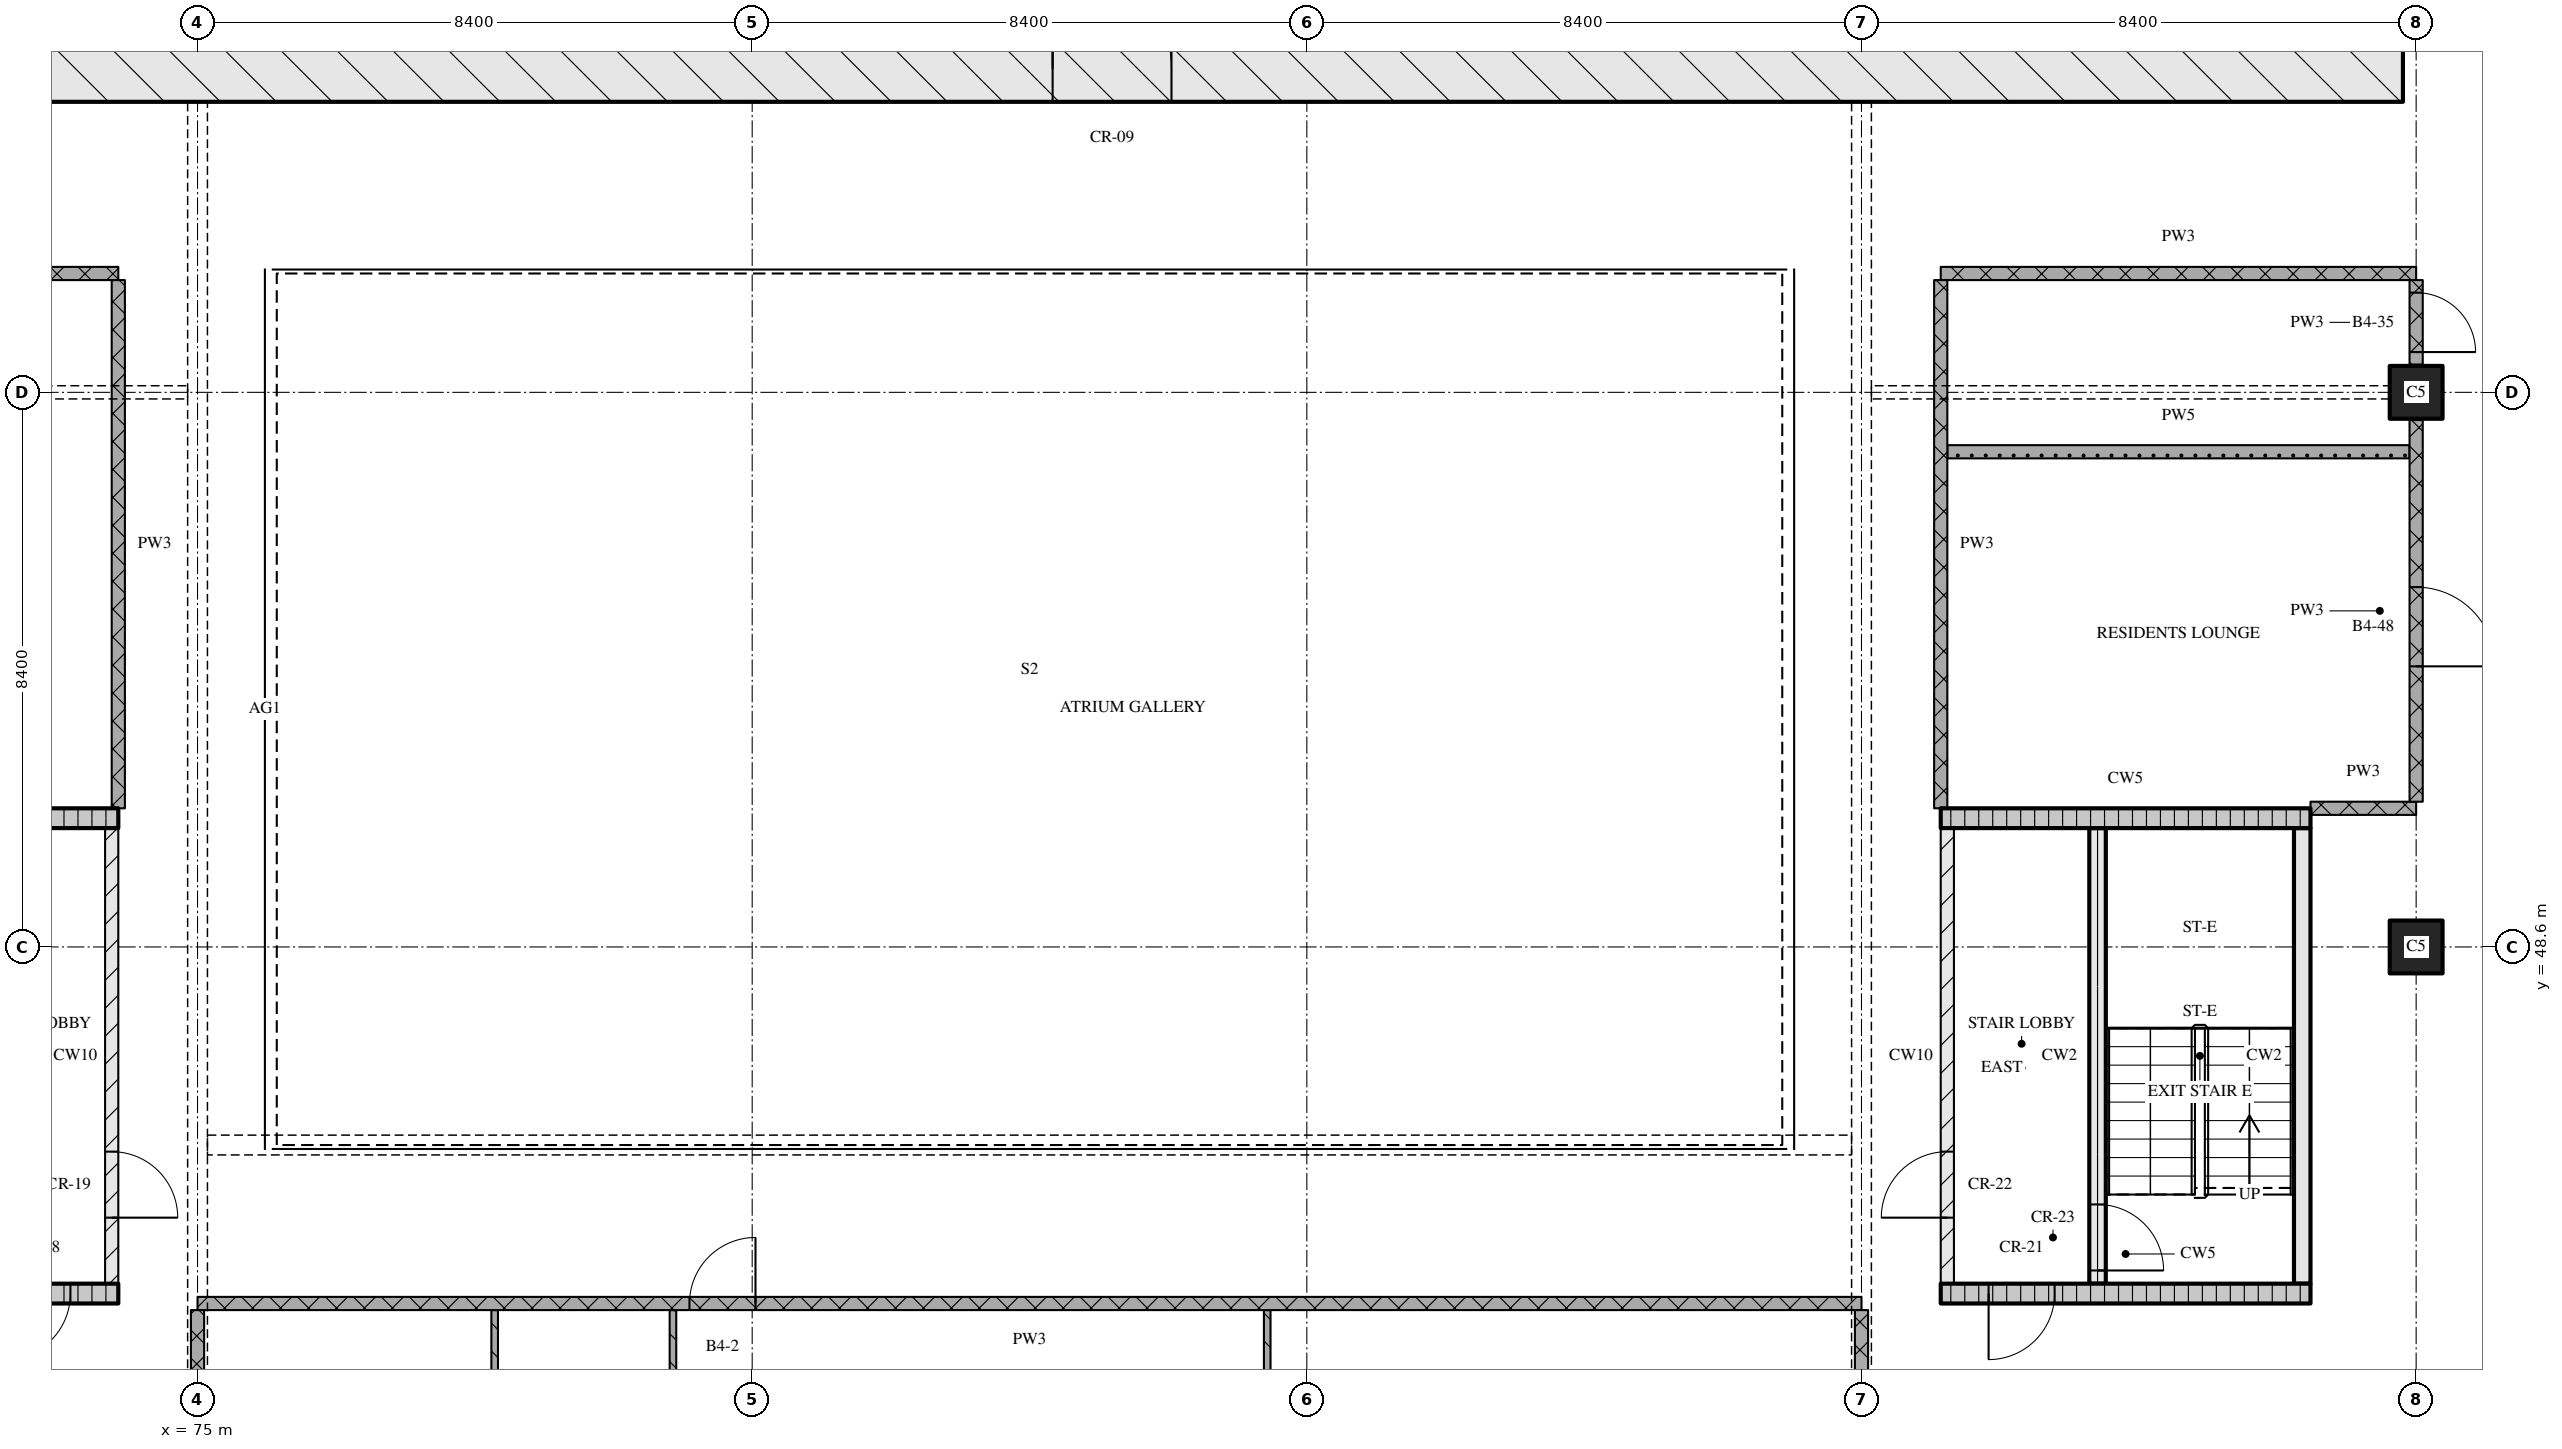
"""IFC4 building model, lengths in metres.
Left out: names, types, materials, properties, quantities, classifications, styles, units other than length and angle.
Written with IfcOpenShell. Run it as: python <this file> out.ifc"""

import sys

from ifc_helpers import new_model, si_unit, direction, frame, frame_2d, origin, origin_2d, place, context, subcontext, project, spatial, rectangle, extrude, element, fill, save


model = new_model("IFC4")
c1 = context("Model", 3, precision=1e-05, world=origin(), true_north=direction((0.0, 1.0)))
c2 = subcontext(c1, "Body", "Model", "MODEL_VIEW")
j1 = project(units=[si_unit("LENGTHUNIT", "METRE"), si_unit("PLANEANGLEUNIT", "RADIAN")], contexts=[c1])
p1 = place(None, origin())
s1 = spatial("IfcSite", under=j1, at=p1, CompositionType="ELEMENT")
p2 = place(p1, origin())
s2 = spatial("IfcBuilding", under=s1, at=p2, CompositionType="ELEMENT")
p3 = place(p2, frame((0.0, 0.0, 127.65)))
s3 = spatial("IfcBuildingStorey", under=s2, at=p3, CompositionType="ELEMENT", Elevation=127.65)
for number, where, z_axis, x_axis in (
    (1, (108.6, 48.6, 0.0), (0.0, 0.0, 1.0), (1.0, 0.0, 0.0)),
    (2, (108.6, 57.0, 0.0), (0.0, 0.0, 1.0), (1.0, 0.0, 0.0)),
):
    element("IfcColumn", number, at=place(p3, frame(where, z_axis=z_axis, x_axis=x_axis)), inside=s3, PredefinedType="COLUMN", context=c2, shape_type="SweptSolid", body=[
        extrude(rectangle(XDim=0.8, YDim=0.8, at=origin_2d()), origin(), (0.0, 0.0, 1.0), 3.6),
    ])
p4 = place(p3, frame((66.8, 61.9, 0.0), z_axis=(0.0, 0.0, 1.0), x_axis=(1.0, 0.0, 0.0)))
e3 = element("IfcWall", 3, at=p4, inside=s3, PredefinedType="SOLIDWALL", context=c2, shape_type="SweptSolid", body=[
    extrude(rectangle(XDim=41.6, YDim=1.0, at=frame_2d((20.8, 0.0))), origin(), (0.0, 0.0, 1.0), 3.32),
])
p5 = place(p4, frame((21.15, 0.0, 0.0)))
e4 = element("IfcOpeningElement", 4, at=p5, cuts=e3, PredefinedType="OPENING", context=c2, shape_type="SweptSolid", body=[
    extrude(rectangle(XDim=1.8, YDim=2.1, at=frame_2d((0.9, 1.05))), frame((0.0, 0.51, 0.0), z_axis=(0.0, -1.0, 0.0), x_axis=(1.0, 0.0, 0.0)), (0.0, 0.0, 1.0), 1.02),
])
p6 = place(p3, frame((68.2, 43.35, 0.0), z_axis=(0.0, 0.0, 1.0), x_axis=(1.0, 0.0, 0.0)))
e5 = element("IfcWall", 5, at=p6, inside=s3, PredefinedType="SOLIDWALL", context=c2, shape_type="SweptSolid", body=[
    extrude(rectangle(XDim=5.6, YDim=0.3, at=frame_2d((2.8, 0.0))), origin(), (0.0, 0.0, 1.0), 3.32),
])
p7 = place(p6, frame((3.875, 0.0, 0.0)))
e6 = element("IfcOpeningElement", 6, at=p7, cuts=e5, PredefinedType="OPENING", context=c2, shape_type="SweptSolid", body=[
    extrude(rectangle(XDim=1.0, YDim=2.1, at=frame_2d((0.5, 1.05))), frame((0.0, 0.16, 0.0), z_axis=(0.0, -1.0, 0.0), x_axis=(1.0, 0.0, 0.0)), (0.0, 0.0, 1.0), 0.32),
])
p8 = place(p3, frame((73.7, 43.5, 0.0), z_axis=(0.0, 0.0, 1.0), x_axis=(0.0, 1.0, 0.0)))
e7 = element("IfcWall", 7, at=p8, inside=s3, PredefinedType="PARTITIONING", context=c2, shape_type="SweptSolid", body=[
    extrude(rectangle(XDim=6.9, YDim=0.2, at=frame_2d((3.45, 0.0))), origin(), (0.0, 0.0, 1.0), 3.32),
])
p9 = place(p8, frame((1.0, 0.0, 0.0)))
e8 = element("IfcOpeningElement", 8, at=p9, cuts=e7, PredefinedType="OPENING", context=c2, shape_type="SweptSolid", body=[
    extrude(rectangle(XDim=1.0, YDim=2.1, at=frame_2d((0.5, 1.05))), frame((0.0, 0.11, 0.0), z_axis=(0.0, -1.0, 0.0), x_axis=(1.0, 0.0, 0.0)), (0.0, 0.0, 1.0), 0.22),
])
p10 = place(p3, frame((68.2, 50.55, 0.0), z_axis=(0.0, 0.0, 1.0), x_axis=(1.0, 0.0, 0.0)))
e9 = element("IfcWall", 9, at=p10, inside=s3, PredefinedType="SOLIDWALL", context=c2, shape_type="SweptSolid", body=[
    extrude(rectangle(XDim=5.6, YDim=0.3, at=frame_2d((2.8, 0.0))), origin(), (0.0, 0.0, 1.0), 3.32),
])
p11 = place(p3, frame((101.4, 43.35, 0.0), z_axis=(0.0, 0.0, 1.0), x_axis=(1.0, 0.0, 0.0)))
e10 = element("IfcWall", 10, at=p11, inside=s3, PredefinedType="SOLIDWALL", context=c2, shape_type="SweptSolid", body=[
    extrude(rectangle(XDim=5.6, YDim=0.3, at=frame_2d((2.8, 0.0))), origin(), (0.0, 0.0, 1.0), 3.32),
])
p12 = place(p11, frame((0.725, 0.0, 0.0)))
e11 = element("IfcOpeningElement", 11, at=p12, cuts=e10, PredefinedType="OPENING", context=c2, shape_type="SweptSolid", body=[
    extrude(rectangle(XDim=1.0, YDim=2.1, at=frame_2d((0.5, 1.05))), frame((0.0, 0.16, 0.0), z_axis=(0.0, -1.0, 0.0), x_axis=(1.0, 0.0, 0.0)), (0.0, 0.0, 1.0), 0.32),
])
p13 = place(p3, frame((101.5, 43.5, 0.0), z_axis=(0.0, 0.0, 1.0), x_axis=(0.0, 1.0, 0.0)))
e12 = element("IfcWall", 12, at=p13, inside=s3, PredefinedType="PARTITIONING", context=c2, shape_type="SweptSolid", body=[
    extrude(rectangle(XDim=6.9, YDim=0.2, at=frame_2d((3.45, 0.0))), origin(), (0.0, 0.0, 1.0), 3.32),
])
p14 = place(p13, frame((1.0, 0.0, 0.0)))
e13 = element("IfcOpeningElement", 13, at=p14, cuts=e12, PredefinedType="OPENING", context=c2, shape_type="SweptSolid", body=[
    extrude(rectangle(XDim=1.0, YDim=2.1, at=frame_2d((0.5, 1.05))), frame((0.0, 0.11, 0.0), z_axis=(0.0, -1.0, 0.0), x_axis=(1.0, 0.0, 0.0)), (0.0, 0.0, 1.0), 0.22),
])
p15 = place(p3, frame((103.775, 43.5, 0.0), z_axis=(0.0, 0.0, 1.0), x_axis=(0.0, 1.0, 0.0)))
e14 = element("IfcWall", 14, at=p15, inside=s3, PredefinedType="SOLIDWALL", context=c2, shape_type="SweptSolid", body=[
    extrude(rectangle(XDim=6.9, YDim=0.25, at=frame_2d((3.45, 0.0))), origin(), (0.0, 0.0, 1.0), 3.32),
])
p16 = place(p15, frame((0.2, 0.0, 0.0)))
e15 = element("IfcOpeningElement", 15, at=p16, cuts=e14, PredefinedType="OPENING", context=c2, shape_type="SweptSolid", body=[
    extrude(rectangle(XDim=1.0, YDim=2.1, at=frame_2d((0.5, 1.05))), frame((0.0, 0.135, 0.0), z_axis=(0.0, -1.0, 0.0), x_axis=(1.0, 0.0, 0.0)), (0.0, 0.0, 1.0), 0.27),
])
p17 = place(p3, frame((106.875, 43.5, 0.0), z_axis=(0.0, 0.0, 1.0), x_axis=(0.0, 1.0, 0.0)))
e16 = element("IfcWall", 16, at=p17, inside=s3, PredefinedType="SOLIDWALL", context=c2, shape_type="SweptSolid", body=[
    extrude(rectangle(XDim=6.9, YDim=0.25, at=frame_2d((3.45, 0.0))), origin(), (0.0, 0.0, 1.0), 3.32),
])
p18 = place(p3, frame((101.4, 50.55, 0.0), z_axis=(0.0, 0.0, 1.0), x_axis=(1.0, 0.0, 0.0)))
e17 = element("IfcWall", 17, at=p18, inside=s3, PredefinedType="SOLIDWALL", context=c2, shape_type="SweptSolid", body=[
    extrude(rectangle(XDim=5.6, YDim=0.3, at=frame_2d((2.8, 0.0))), origin(), (0.0, 0.0, 1.0), 3.32),
])
p19 = place(p3, frame((100.2, 43.2, 0.0), z_axis=(0.0, 0.0, 1.0), x_axis=(-1.0, 0.0, 0.0)))
e18 = element("IfcWall", 18, at=p19, inside=s3, PredefinedType="PARTITIONING", context=c2, shape_type="SweptSolid", body=[
    extrude(rectangle(XDim=25.2, YDim=0.2, at=frame_2d((12.6, 0.0))), origin(), (0.0, 0.0, 1.0), 3.32),
])
p20 = place(p19, frame((16.75, 0.0, 0.0)))
e19 = element("IfcOpeningElement", 19, at=p20, cuts=e18, PredefinedType="OPENING", context=c2, shape_type="SweptSolid", body=[
    extrude(rectangle(XDim=1.0, YDim=2.1, at=frame_2d((0.5, 1.05))), frame((0.0, 0.11, 0.0), z_axis=(0.0, -1.0, 0.0), x_axis=(1.0, 0.0, 0.0)), (0.0, 0.0, 1.0), 0.22),
])
p21 = place(p3, frame((107.0, 50.7, 0.0), z_axis=(0.0, 0.0, 1.0), x_axis=(1.0, 0.0, 0.0)))
e20 = element("IfcWall", 20, at=p21, inside=s3, PredefinedType="PARTITIONING", context=c2, shape_type="SweptSolid", body=[
    extrude(rectangle(XDim=1.6, YDim=0.2, at=frame_2d((0.8, 0.0))), origin(), (0.0, 0.0, 1.0), 3.32),
])
p22 = place(p3, frame((101.5, 56.1, 0.0), z_axis=(0.0, 0.0, 1.0), x_axis=(1.0, 0.0, 0.0)))
e21 = element("IfcWall", 21, at=p22, inside=s3, PredefinedType="PARTITIONING", context=c2, shape_type="SweptSolid", body=[
    extrude(rectangle(XDim=7.0, YDim=0.2, at=frame_2d((3.5, 0.0))), origin(), (0.0, 0.0, 1.0), 3.32),
])
p23 = place(p3, frame((73.8, 58.8, 0.0), z_axis=(0.0, 0.0, 1.0), x_axis=(-1.0, 0.0, 0.0)))
e22 = element("IfcWall", 22, at=p23, inside=s3, PredefinedType="PARTITIONING", context=c2, shape_type="SweptSolid", body=[
    extrude(rectangle(XDim=7.2, YDim=0.2, at=frame_2d((3.6, 0.0))), origin(), (0.0, 0.0, 1.0), 3.32),
])
p24 = place(p23, frame((3.0, 0.0, 0.0)))
e23 = element("IfcOpeningElement", 23, at=p24, cuts=e22, PredefinedType="OPENING", context=c2, shape_type="SweptSolid", body=[
    extrude(rectangle(XDim=1.2, YDim=2.1, at=frame_2d((0.6, 1.05))), frame((0.0, 0.11, 0.0), z_axis=(0.0, -1.0, 0.0), x_axis=(1.0, 0.0, 0.0)), (0.0, 0.0, 1.0), 0.22),
])
p25 = place(p3, frame((101.4, 58.8, 0.0), z_axis=(0.0, 0.0, 1.0), x_axis=(1.0, 0.0, 0.0)))
e24 = element("IfcWall", 24, at=p25, inside=s3, PredefinedType="PARTITIONING", context=c2, shape_type="SweptSolid", body=[
    extrude(rectangle(XDim=7.2, YDim=0.2, at=frame_2d((3.6, 0.0))), origin(), (0.0, 0.0, 1.0), 3.32),
])
p26 = place(p3, frame((73.8, 58.7, 0.0), z_axis=(0.0, 0.0, 1.0), x_axis=(0.0, -1.0, 0.0)))
e25 = element("IfcWall", 25, at=p26, inside=s3, PredefinedType="PARTITIONING", context=c2, shape_type="SweptSolid", body=[
    extrude(rectangle(XDim=8.0, YDim=0.2, at=frame_2d((4.0, 0.0))), origin(), (0.0, 0.0, 1.0), 3.32),
])
p27 = place(p3, frame((75.0, 43.1, 0.0), z_axis=(0.0, 0.0, 1.0), x_axis=(0.0, -1.0, 0.0)))
e26 = element("IfcWall", 26, at=p27, inside=s3, PredefinedType="PARTITIONING", context=c2, shape_type="SweptSolid", body=[
    extrude(rectangle(XDim=2.2, YDim=0.2, at=frame_2d((1.1, 0.0))), origin(), (0.0, 0.0, 1.0), 2.43),
])
p28 = place(p3, frame((79.5, 43.1, 0.0), z_axis=(0.0, 0.0, 1.0), x_axis=(0.0, -1.0, 0.0)))
e27 = element("IfcWall", 27, at=p28, inside=s3, PredefinedType="PARTITIONING", context=c2, shape_type="SweptSolid", body=[
    extrude(rectangle(XDim=4.35, YDim=0.1, at=frame_2d((2.175, 0.0))), origin(), (0.0, 0.0, 1.0), 3.32),
])
p29 = place(p3, frame((82.2, 38.75, 0.0), z_axis=(0.0, 0.0, 1.0), x_axis=(0.0, 1.0, 0.0)))
e28 = element("IfcWall", 28, at=p29, inside=s3, PredefinedType="PARTITIONING", context=c2, shape_type="SweptSolid", body=[
    extrude(rectangle(XDim=4.35, YDim=0.1, at=frame_2d((2.175, 0.0))), origin(), (0.0, 0.0, 1.0), 3.32),
])
p30 = place(p29, frame((1.95, 0.0, 0.0)))
e29 = element("IfcOpeningElement", 29, at=p30, cuts=e28, PredefinedType="OPENING", context=c2, shape_type="SweptSolid", body=[
    extrude(rectangle(XDim=0.8, YDim=2.1, at=frame_2d((0.4, 1.05))), frame((0.0, 0.06, 0.0), z_axis=(0.0, -1.0, 0.0), x_axis=(1.0, 0.0, 0.0)), (0.0, 0.0, 1.0), 0.12),
])
p31 = place(p3, frame((91.2, 43.1, 0.0), z_axis=(0.0, 0.0, 1.0), x_axis=(0.0, -1.0, 0.0)))
e30 = element("IfcWall", 30, at=p31, inside=s3, PredefinedType="PARTITIONING", context=c2, shape_type="SweptSolid", body=[
    extrude(rectangle(XDim=4.35, YDim=0.1, at=frame_2d((2.175, 0.0))), origin(), (0.0, 0.0, 1.0), 3.32),
])
p32 = place(p3, frame((100.2, 43.1, 0.0), z_axis=(0.0, 0.0, 1.0), x_axis=(0.0, -1.0, 0.0)))
e31 = element("IfcWall", 31, at=p32, inside=s3, PredefinedType="PARTITIONING", context=c2, shape_type="SweptSolid", body=[
    extrude(rectangle(XDim=2.2, YDim=0.2, at=frame_2d((1.1, 0.0))), origin(), (0.0, 0.0, 1.0), 2.43),
])
p33 = place(p3, frame((101.4, 58.7, 0.0), z_axis=(0.0, 0.0, 1.0), x_axis=(0.0, -1.0, 0.0)))
e32 = element("IfcWall", 32, at=p33, inside=s3, PredefinedType="PARTITIONING", context=c2, shape_type="SweptSolid", body=[
    extrude(rectangle(XDim=8.0, YDim=0.2, at=frame_2d((4.0, 0.0))), origin(), (0.0, 0.0, 1.0), 3.32),
])
p34 = place(p3, frame((108.6, 50.8, 0.0), z_axis=(0.0, 0.0, 1.0), x_axis=(0.0, 1.0, 0.0)))
e33 = element("IfcWall", 33, at=p34, inside=s3, PredefinedType="PARTITIONING", context=c2, shape_type="SweptSolid", body=[
    extrude(rectangle(XDim=5.78, YDim=0.2, at=frame_2d((2.89, 0.0))), origin(), (0.0, 0.0, 1.0), 3.32),
])
p35 = place(p34, frame((2.05, 0.0, 0.0)))
e34 = element("IfcOpeningElement", 34, at=p35, cuts=e33, PredefinedType="OPENING", context=c2, shape_type="SweptSolid", body=[
    extrude(rectangle(XDim=1.2, YDim=2.1, at=frame_2d((0.6, 1.05))), frame((0.0, 0.11, 0.0), z_axis=(0.0, -1.0, 0.0), x_axis=(1.0, 0.0, 0.0)), (0.0, 0.0, 1.0), 0.22),
])
p36 = place(p3, frame((108.6, 57.42, 0.0), z_axis=(0.0, 0.0, 1.0), x_axis=(0.0, 1.0, 0.0)))
e35 = element("IfcWall", 35, at=p36, inside=s3, PredefinedType="PARTITIONING", context=c2, shape_type="SweptSolid", body=[
    extrude(rectangle(XDim=1.28, YDim=0.2, at=frame_2d((0.64, 0.0))), origin(), (0.0, 0.0, 1.0), 3.32),
])
p37 = place(p36, frame((0.19, 0.0, 0.0)))
e36 = element("IfcOpeningElement", 36, at=p37, cuts=e35, PredefinedType="OPENING", context=c2, shape_type="SweptSolid", body=[
    extrude(rectangle(XDim=0.9, YDim=2.1, at=frame_2d((0.45, 1.05))), frame((0.0, 0.11, 0.0), z_axis=(0.0, -1.0, 0.0), x_axis=(1.0, 0.0, 0.0)), (0.0, 0.0, 1.0), 0.22),
])
p38 = place(p5, origin())
e37 = element("IfcDoor", 37, at=p38, inside=s3, OperationType="DOUBLE_DOOR_SINGLE_SWING", PredefinedType="DOOR", context=c2, shape_type="SweptSolid", body=[
    extrude(rectangle(XDim=1.8, YDim=2.1, at=frame_2d((0.9, 1.05))), frame((0.0, 0.025, 0.0), z_axis=(0.0, -1.0, 0.0), x_axis=(1.0, 0.0, 0.0)), (0.0, 0.0, 1.0), 0.05),
])
fill(e4, e37)
p39 = place(p7, origin())
e38 = element("IfcDoor", 38, at=p39, inside=s3, OperationType="SINGLE_SWING_RIGHT", PredefinedType="DOOR", context=c2, shape_type="SweptSolid", body=[
    extrude(rectangle(XDim=1.0, YDim=2.1, at=frame_2d((0.5, 1.05))), frame((0.0, 0.025, 0.0), z_axis=(0.0, -1.0, 0.0), x_axis=(1.0, 0.0, 0.0)), (0.0, 0.0, 1.0), 0.05),
])
fill(e6, e38)
p40 = place(p9, origin())
e39 = element("IfcDoor", 39, at=p40, inside=s3, OperationType="SINGLE_SWING_RIGHT", PredefinedType="DOOR", context=c2, shape_type="SweptSolid", body=[
    extrude(rectangle(XDim=1.0, YDim=2.1, at=frame_2d((0.5, 1.05))), frame((0.0, 0.025, 0.0), z_axis=(0.0, -1.0, 0.0), x_axis=(1.0, 0.0, 0.0)), (0.0, 0.0, 1.0), 0.05),
])
fill(e8, e39)
p41 = place(p12, origin())
e40 = element("IfcDoor", 40, at=p41, inside=s3, OperationType="SINGLE_SWING_RIGHT", PredefinedType="DOOR", context=c2, shape_type="SweptSolid", body=[
    extrude(rectangle(XDim=1.0, YDim=2.1, at=frame_2d((0.5, 1.05))), frame((0.0, 0.025, 0.0), z_axis=(0.0, -1.0, 0.0), x_axis=(1.0, 0.0, 0.0)), (0.0, 0.0, 1.0), 0.05),
])
fill(e11, e40)
p42 = place(p16, origin())
e41 = element("IfcDoor", 41, at=p42, inside=s3, OperationType="SINGLE_SWING_RIGHT", PredefinedType="DOOR", context=c2, shape_type="SweptSolid", body=[
    extrude(rectangle(XDim=1.0, YDim=2.1, at=frame_2d((0.5, 1.05))), frame((0.0, 0.025, 0.0), z_axis=(0.0, -1.0, 0.0), x_axis=(1.0, 0.0, 0.0)), (0.0, 0.0, 1.0), 0.05),
])
fill(e15, e41)
p43 = place(p14, origin())
e42 = element("IfcDoor", 42, at=p43, inside=s3, OperationType="SINGLE_SWING_LEFT", PredefinedType="DOOR", context=c2, shape_type="SweptSolid", body=[
    extrude(rectangle(XDim=1.0, YDim=2.1, at=frame_2d((0.5, 1.05))), frame((0.0, 0.025, 0.0), z_axis=(0.0, -1.0, 0.0), x_axis=(1.0, 0.0, 0.0)), (0.0, 0.0, 1.0), 0.05),
])
fill(e13, e42)
p44 = place(p20, origin())
e43 = element("IfcDoor", 43, at=p44, inside=s3, OperationType="SINGLE_SWING_RIGHT", PredefinedType="DOOR", context=c2, shape_type="SweptSolid", body=[
    extrude(rectangle(XDim=1.0, YDim=2.1, at=frame_2d((0.5, 1.05))), frame((0.0, 0.025, 0.0), z_axis=(0.0, -1.0, 0.0), x_axis=(1.0, 0.0, 0.0)), (0.0, 0.0, 1.0), 0.05),
])
fill(e19, e43)
p45 = place(p35, origin())
e44 = element("IfcDoor", 44, at=p45, inside=s3, OperationType="SINGLE_SWING_RIGHT", PredefinedType="DOOR", context=c2, shape_type="SweptSolid", body=[
    extrude(rectangle(XDim=1.2, YDim=2.1, at=frame_2d((0.6, 1.05))), frame((0.0, 0.025, 0.0), z_axis=(0.0, -1.0, 0.0), x_axis=(1.0, 0.0, 0.0)), (0.0, 0.0, 1.0), 0.05),
])
fill(e34, e44)
p46 = place(p37, origin())
e45 = element("IfcDoor", 45, at=p46, inside=s3, OperationType="SINGLE_SWING_RIGHT", PredefinedType="DOOR", context=c2, shape_type="SweptSolid", body=[
    extrude(rectangle(XDim=0.9, YDim=2.1, at=frame_2d((0.45, 1.05))), frame((0.0, 0.025, 0.0), z_axis=(0.0, -1.0, 0.0), x_axis=(1.0, 0.0, 0.0)), (0.0, 0.0, 1.0), 0.05),
])
fill(e36, e45)
save(model, sys.argv[1])
